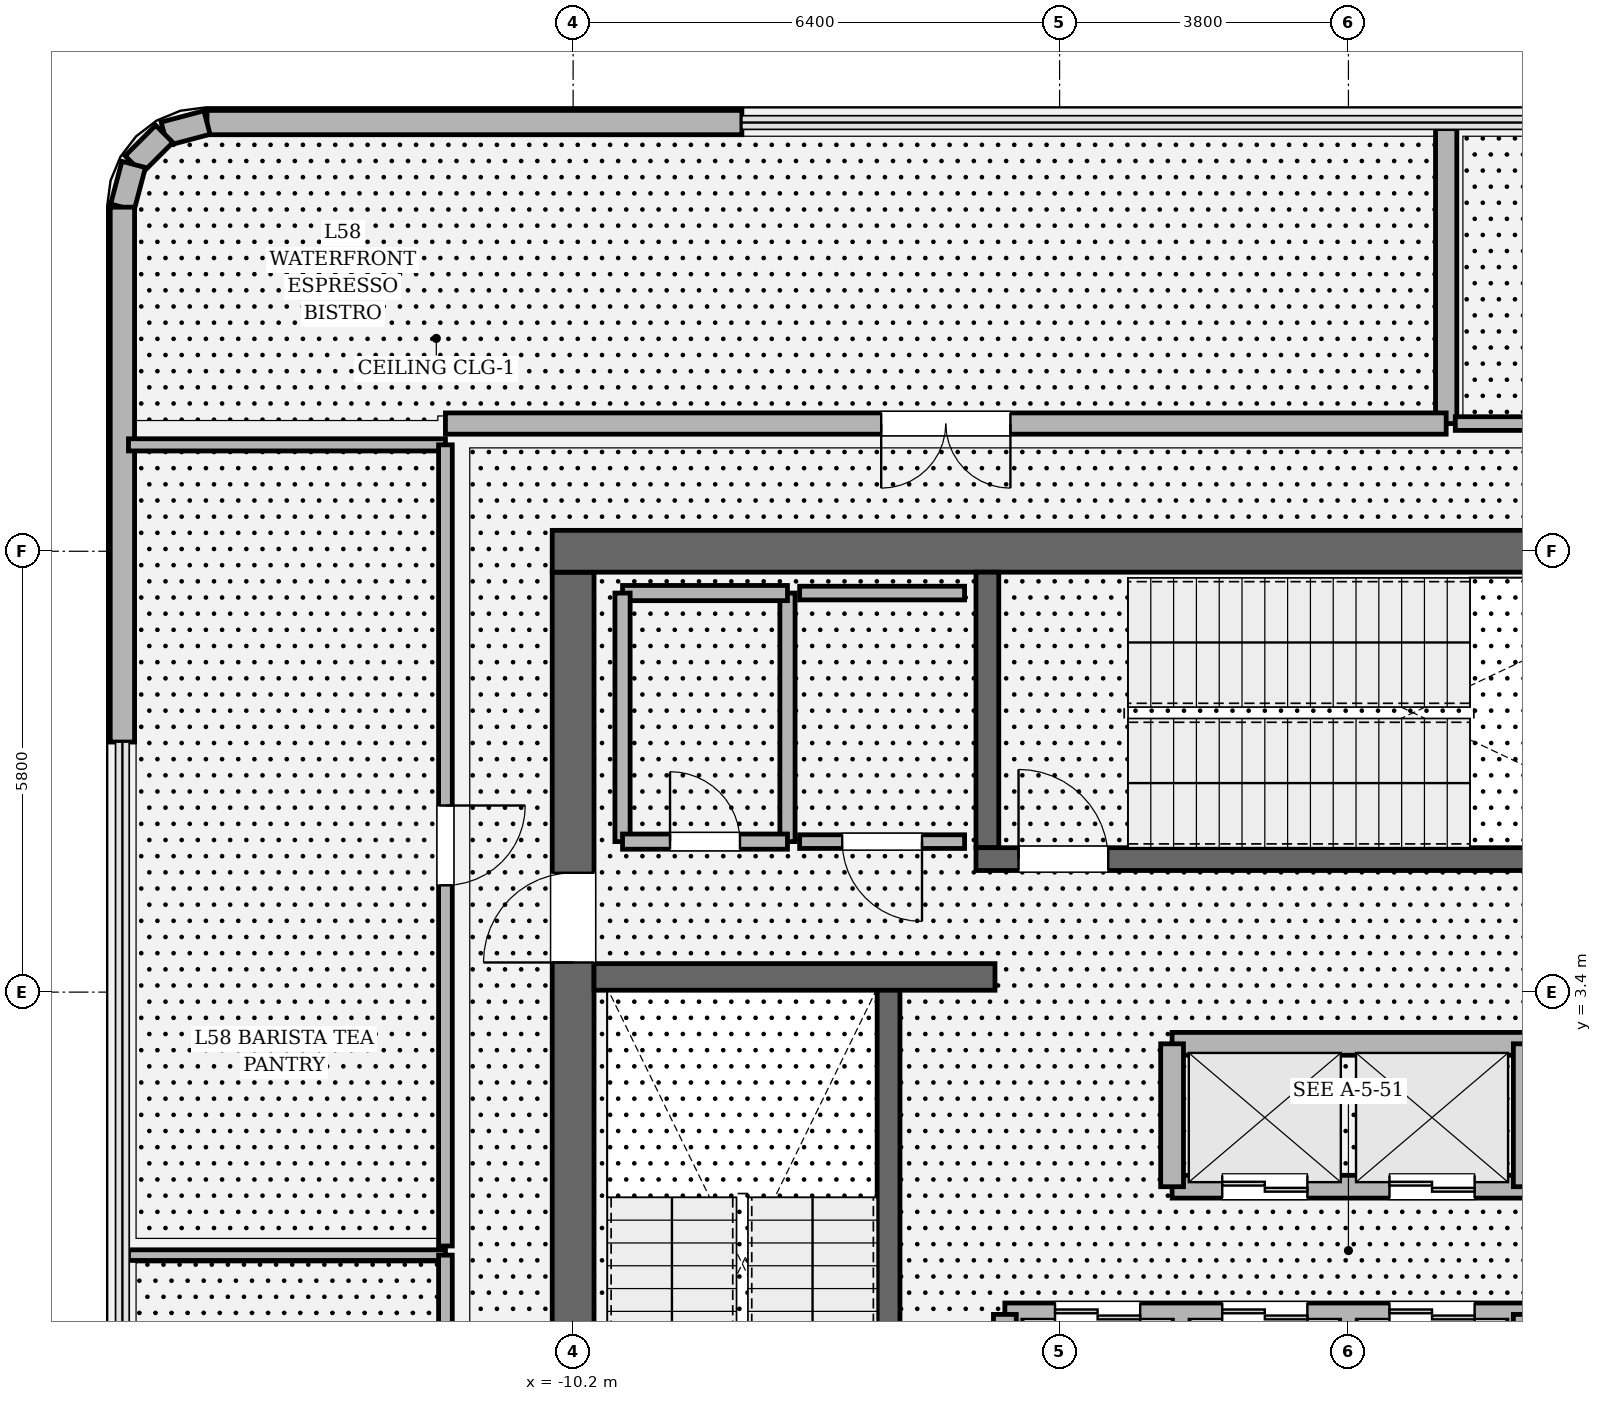
"""IFC4 building model, lengths in metres.
Left out: names, types, materials, properties, quantities, classifications, styles, units other than length and angle.
Written with IfcOpenShell. Run it as: python <this file> out.ifc"""

import sys

from ifc_helpers import new_model, si_unit, direction, frame, frame_2d, origin, place, context, subcontext, project, spatial, rectangle, extrude, element, fill, save


model = new_model("IFC4")
c1 = context("Model", 3, precision=1e-05, world=origin(), true_north=direction((0.0, 1.0)))
c2 = subcontext(c1, "Body", "Model", "MODEL_VIEW")
j1 = project(units=[si_unit("LENGTHUNIT", "METRE"), si_unit("PLANEANGLEUNIT", "RADIAN")], contexts=[c1])
p1 = place(None, origin())
s1 = spatial("IfcSite", under=j1, at=p1, CompositionType="ELEMENT")
p2 = place(p1, origin())
s2 = spatial("IfcBuilding", under=s1, at=p2, CompositionType="ELEMENT")
p3 = place(p2, frame((0.0, 0.0, 246.6)))
s3 = spatial("IfcBuildingStorey", under=s2, at=p3, CompositionType="ELEMENT", Elevation=246.6)
p4 = place(p3, frame((-10.2, -8.925, 0.0), z_axis=(0.0, 0.0, 1.0), x_axis=(0.0, 1.0, 0.0)))
e1 = element("IfcWall", 1, at=p4, inside=s3, PredefinedType="SHEAR", context=c2, shape_type="SweptSolid", body=[
    extrude(rectangle(XDim=17.85, YDim=0.55, at=frame_2d((8.925, 0.0))), origin(), (0.0, 0.0, 1.0), 4.8),
])
p5 = place(p4, frame((12.715, 0.0, 0.0)))
e2 = element("IfcOpeningElement", 2, at=p5, cuts=e1, PredefinedType="OPENING", context=c2, shape_type="SweptSolid", body=[
    extrude(rectangle(XDim=1.18, YDim=2.2, at=frame_2d((0.59, 1.1))), frame((0.0, 0.285, 0.0), z_axis=(0.0, -1.0, 0.0), x_axis=(1.0, 0.0, 0.0)), (0.0, 0.0, 1.0), 0.57),
])
p6 = place(p3, frame((-10.475, 9.2, 0.0), z_axis=(0.0, 0.0, 1.0), x_axis=(1.0, 0.0, 0.0)))
e3 = element("IfcWall", 3, at=p6, inside=s3, PredefinedType="SHEAR", context=c2, shape_type="SweptSolid", body=[
    extrude(rectangle(XDim=20.95, YDim=0.55, at=frame_2d((10.475, 0.0))), origin(), (0.0, 0.0, 1.0), 4.8),
])
p7 = place(p3, frame((-6.05, -5.5, 0.0), z_axis=(0.0, 0.0, 1.0), x_axis=(0.0, 1.0, 0.0)))
e4 = element("IfcWall", 4, at=p7, inside=s3, PredefinedType="SOLIDWALL", context=c2, shape_type="SweptSolid", body=[
    extrude(rectangle(XDim=8.95, YDim=0.3, at=frame_2d((4.475, 0.0))), origin(), (0.0, 0.0, 1.0), 4.8),
])
p8 = place(p3, frame((-4.75, 5.3, 0.0), z_axis=(0.0, 0.0, 1.0), x_axis=(0.0, 1.0, 0.0)))
e5 = element("IfcWall", 5, at=p8, inside=s3, PredefinedType="SOLIDWALL", context=c2, shape_type="SweptSolid", body=[
    extrude(rectangle(XDim=3.625, YDim=0.3, at=frame_2d((1.812, 0.0))), origin(), (0.0, 0.0, 1.0), 4.8),
])
p9 = place(p3, frame((-4.9, 5.15, 0.0), z_axis=(0.0, 0.0, 1.0), x_axis=(1.0, 0.0, 0.0)))
e6 = element("IfcWall", 6, at=p9, inside=s3, PredefinedType="SOLIDWALL", context=c2, shape_type="SweptSolid", body=[
    extrude(rectangle(XDim=9.8, YDim=0.3, at=frame_2d((4.9, 0.0))), origin(), (0.0, 0.0, 1.0), 4.8),
])
p10 = place(p9, frame((0.56, 0.0, 0.0)))
e7 = element("IfcOpeningElement", 7, at=p10, cuts=e6, PredefinedType="OPENING", context=c2, shape_type="SweptSolid", body=[
    extrude(rectangle(XDim=1.18, YDim=2.2, at=frame_2d((0.59, 1.1))), frame((0.0, 0.16, 0.0), z_axis=(0.0, -1.0, 0.0), x_axis=(1.0, 0.0, 0.0)), (0.0, 0.0, 1.0), 0.32),
])
p11 = place(p3, frame((-9.925, 3.6, 0.0), z_axis=(0.0, 0.0, 1.0), x_axis=(1.0, 0.0, 0.0)))
e8 = element("IfcWall", 8, at=p11, inside=s3, PredefinedType="SOLIDWALL", context=c2, shape_type="SweptSolid", body=[
    extrude(rectangle(XDim=5.275, YDim=0.35, at=frame_2d((2.638, 0.0))), origin(), (0.0, 0.0, 1.0), 4.8),
])
p12 = place(p3, frame((-7.98, 14.84, 0.0), z_axis=(0.0, 0.0, 1.0), x_axis=(-1.0, 0.0, 0.0)))
e9 = element("IfcWall", 9, at=p12, inside=s3, PredefinedType="SOLIDWALL", context=c2, shape_type="SweptSolid", body=[
    extrude(rectangle(XDim=7.037, YDim=0.32, at=frame_2d((3.519, 0.0))), origin(), (0.0, 0.0, 1.0), 3.194),
])
p13 = place(p3, frame((-15.017, 14.84, 0.0), z_axis=(0.0, 0.0, 1.0), x_axis=(-0.966665515501, -0.256042537758, 0.0)))
e10 = element("IfcWall", 10, at=p13, inside=s3, PredefinedType="SOLIDWALL", context=c2, shape_type="SweptSolid", body=[
    extrude(rectangle(XDim=0.582, YDim=0.32, at=frame_2d((0.291, 0.0))), origin(), (0.0, 0.0, 1.0), 4.52),
])
p14 = place(p3, frame((-15.579, 14.691, 0.0), z_axis=(0.0, 0.0, 1.0), x_axis=(-0.707106781187, -0.707106781187, 0.0)))
e11 = element("IfcWall", 11, at=p14, inside=s3, PredefinedType="SOLIDWALL", context=c2, shape_type="SweptSolid", body=[
    extrude(rectangle(XDim=0.569, YDim=0.32, at=frame_2d((0.284, 0.0))), origin(), (0.0, 0.0, 1.0), 4.52),
])
p15 = place(p3, frame((-15.981, 14.289, 0.0), z_axis=(0.0, 0.0, 1.0), x_axis=(-0.255650250031, -0.966769336325, 0.0)))
e12 = element("IfcWall", 12, at=p15, inside=s3, PredefinedType="SOLIDWALL", context=c2, shape_type="SweptSolid", body=[
    extrude(rectangle(XDim=0.582, YDim=0.32, at=frame_2d((0.291, 0.0))), origin(), (0.0, 0.0, 1.0), 4.52),
])
p16 = place(p3, frame((-16.13, 13.727, 0.0), z_axis=(0.0, 0.0, 1.0), x_axis=(0.0, -1.0, 0.0)))
e13 = element("IfcWall", 13, at=p16, inside=s3, PredefinedType="SOLIDWALL", context=c2, shape_type="SweptSolid", body=[
    extrude(rectangle(XDim=7.037, YDim=0.32, at=frame_2d((3.519, 0.0))), origin(), (0.0, 0.0, 1.0), 3.194),
])
p17 = place(p3, frame((-4.52, -0.84, 0.0), z_axis=(0.0, 0.0, 1.0), x_axis=(1.0, 0.0, 0.0)))
e14 = element("IfcWall", 14, at=p17, inside=s3, PredefinedType="SOLIDWALL", context=c2, shape_type="SweptSolid", body=[
    extrude(rectangle(XDim=6.84, YDim=0.3, at=frame_2d((3.42, 0.0))), origin(), (0.0, 0.0, 1.0), 4.52),
])
p18 = place(p17, frame((0.66, 0.0, 0.0)))
e15 = element("IfcOpeningElement", 15, at=p18, cuts=e14, PredefinedType="OPENING", context=c2, shape_type="SweptSolid", body=[
    extrude(rectangle(XDim=1.12, YDim=2.25, at=frame_2d((0.56, 1.125))), frame((0.0, 0.16, 0.0), z_axis=(0.0, -1.0, 0.0), x_axis=(1.0, 0.0, 0.0)), (0.0, 0.0, 1.0), 0.32),
])
p19 = place(p17, frame((2.86, 0.0, 0.0)))
e16 = element("IfcOpeningElement", 16, at=p19, cuts=e14, PredefinedType="OPENING", context=c2, shape_type="SweptSolid", body=[
    extrude(rectangle(XDim=1.12, YDim=2.25, at=frame_2d((0.56, 1.125))), frame((0.0, 0.16, 0.0), z_axis=(0.0, -1.0, 0.0), x_axis=(1.0, 0.0, 0.0)), (0.0, 0.0, 1.0), 0.32),
])
p20 = place(p17, frame((5.06, 0.0, 0.0)))
e17 = element("IfcOpeningElement", 17, at=p20, cuts=e14, PredefinedType="OPENING", context=c2, shape_type="SweptSolid", body=[
    extrude(rectangle(XDim=1.12, YDim=2.25, at=frame_2d((0.56, 1.125))), frame((0.0, 0.16, 0.0), z_axis=(0.0, -1.0, 0.0), x_axis=(1.0, 0.0, 0.0)), (0.0, 0.0, 1.0), 0.32),
])
for number, where, z_axis, x_axis in (
    (18, (-4.52, -2.72, 0.0), (0.0, 0.0, 1.0), (0.0, 1.0, 0.0)),
    (19, (2.32, -2.72, 0.0), (0.0, 0.0, 1.0), (0.0, 1.0, 0.0)),
):
    element("IfcWall", number, at=place(p3, frame(where, z_axis=z_axis, x_axis=x_axis)), inside=s3, PredefinedType="SOLIDWALL", context=c2, shape_type="SweptSolid", body=[
        extrude(rectangle(XDim=1.88, YDim=0.3, at=frame_2d((0.94, 0.0))), origin(), (0.0, 0.0, 1.0), 4.52),
    ])
p21 = place(p3, frame((-2.32, 0.84, 0.0), z_axis=(0.0, 0.0, 1.0), x_axis=(1.0, 0.0, 0.0)))
e20 = element("IfcWall", 20, at=p21, inside=s3, PredefinedType="SOLIDWALL", context=c2, shape_type="SweptSolid", body=[
    extrude(rectangle(XDim=4.64, YDim=0.3, at=frame_2d((2.32, 0.0))), origin(), (0.0, 0.0, 1.0), 4.52),
])
p22 = place(p21, frame((0.66, 0.0, 0.0)))
e21 = element("IfcOpeningElement", 21, at=p22, cuts=e20, PredefinedType="OPENING", context=c2, shape_type="SweptSolid", body=[
    extrude(rectangle(XDim=1.12, YDim=2.25, at=frame_2d((0.56, 1.125))), frame((0.0, 0.16, 0.0), z_axis=(0.0, -1.0, 0.0), x_axis=(1.0, 0.0, 0.0)), (0.0, 0.0, 1.0), 0.32),
])
p23 = place(p21, frame((2.86, 0.0, 0.0)))
e22 = element("IfcOpeningElement", 22, at=p23, cuts=e20, PredefinedType="OPENING", context=c2, shape_type="SweptSolid", body=[
    extrude(rectangle(XDim=1.12, YDim=2.25, at=frame_2d((0.56, 1.125))), frame((0.0, 0.16, 0.0), z_axis=(0.0, -1.0, 0.0), x_axis=(1.0, 0.0, 0.0)), (0.0, 0.0, 1.0), 0.32),
])
p24 = place(p3, frame((-2.32, 2.72, 0.0), z_axis=(0.0, 0.0, 1.0), x_axis=(1.0, 0.0, 0.0)))
e23 = element("IfcWall", 23, at=p24, inside=s3, PredefinedType="SOLIDWALL", context=c2, shape_type="SweptSolid", body=[
    extrude(rectangle(XDim=4.64, YDim=0.3, at=frame_2d((2.32, 0.0))), origin(), (0.0, 0.0, 1.0), 4.52),
])
for number, where, z_axis, x_axis in (
    (24, (-2.32, 0.84, 0.0), (0.0, 0.0, 1.0), (0.0, 1.0, 0.0)),
    (25, (2.32, 0.84, 0.0), (0.0, 0.0, 1.0), (0.0, 1.0, 0.0)),
):
    element("IfcWall", number, at=place(p3, frame(where, z_axis=z_axis, x_axis=x_axis)), inside=s3, PredefinedType="SOLIDWALL", context=c2, shape_type="SweptSolid", body=[
        extrude(rectangle(XDim=1.88, YDim=0.3, at=frame_2d((0.94, 0.0))), origin(), (0.0, 0.0, 1.0), 4.52),
    ])
p25 = place(p3, frame((-7.38, 5.38, 0.0), z_axis=(0.0, 0.0, 1.0), x_axis=(0.0, 1.0, 0.0)))
e26 = element("IfcWall", 26, at=p25, inside=s3, PredefinedType="SOLIDWALL", context=c2, shape_type="SweptSolid", body=[
    extrude(rectangle(XDim=3.27, YDim=0.2, at=frame_2d((1.635, 0.0))), origin(), (0.0, 0.0, 1.0), 4.52),
])
p26 = place(p3, frame((-7.38, 8.65, 0.0), z_axis=(0.0, 0.0, 1.0), x_axis=(-1.0, 0.0, 0.0)))
e27 = element("IfcWall", 27, at=p26, inside=s3, PredefinedType="SOLIDWALL", context=c2, shape_type="SweptSolid", body=[
    extrude(rectangle(XDim=2.17, YDim=0.2, at=frame_2d((1.085, 0.0))), origin(), (0.0, 0.0, 1.0), 4.52),
])
p27 = place(p3, frame((-9.55, 8.65, 0.0), z_axis=(0.0, 0.0, 1.0), x_axis=(0.0, -1.0, 0.0)))
e28 = element("IfcWall", 28, at=p27, inside=s3, PredefinedType="SOLIDWALL", context=c2, shape_type="SweptSolid", body=[
    extrude(rectangle(XDim=3.27, YDim=0.2, at=frame_2d((1.635, 0.0))), origin(), (0.0, 0.0, 1.0), 4.52),
])
p28 = place(p3, frame((-9.55, 5.38, 0.0), z_axis=(0.0, 0.0, 1.0), x_axis=(1.0, 0.0, 0.0)))
e29 = element("IfcWall", 29, at=p28, inside=s3, PredefinedType="SOLIDWALL", context=c2, shape_type="SweptSolid", body=[
    extrude(rectangle(XDim=2.17, YDim=0.2, at=frame_2d((1.085, 0.0))), origin(), (0.0, 0.0, 1.0), 4.52),
])
p29 = place(p28, frame((0.625, 0.0, 0.0)))
e30 = element("IfcOpeningElement", 30, at=p29, cuts=e29, PredefinedType="OPENING", context=c2, shape_type="SweptSolid", body=[
    extrude(rectangle(XDim=0.92, YDim=2.1, at=frame_2d((0.46, 1.05))), frame((0.0, 0.11, 0.0), z_axis=(0.0, -1.0, 0.0), x_axis=(1.0, 0.0, 0.0)), (0.0, 0.0, 1.0), 0.22),
])
p30 = place(p3, frame((-5.05, 8.65, 0.0), z_axis=(0.0, 0.0, 1.0), x_axis=(-1.0, 0.0, 0.0)))
e31 = element("IfcWall", 31, at=p30, inside=s3, PredefinedType="PARTITIONING", context=c2, shape_type="SweptSolid", body=[
    extrude(rectangle(XDim=2.17, YDim=0.18, at=frame_2d((1.085, 0.0))), origin(), (0.0, 0.0, 1.0), 4.52),
])
p31 = place(p3, frame((-7.22, 5.38, 0.0), z_axis=(0.0, 0.0, 1.0), x_axis=(1.0, 0.0, 0.0)))
e32 = element("IfcWall", 32, at=p31, inside=s3, PredefinedType="PARTITIONING", context=c2, shape_type="SweptSolid", body=[
    extrude(rectangle(XDim=2.17, YDim=0.18, at=frame_2d((1.085, 0.0))), origin(), (0.0, 0.0, 1.0), 4.52),
])
p32 = place(p31, frame((0.56, 0.0, 0.0)))
e33 = element("IfcOpeningElement", 33, at=p32, cuts=e32, PredefinedType="OPENING", context=c2, shape_type="SweptSolid", body=[
    extrude(rectangle(XDim=1.05, YDim=2.2, at=frame_2d((0.525, 1.1))), frame((0.0, 0.1, 0.0), z_axis=(0.0, -1.0, 0.0), x_axis=(1.0, 0.0, 0.0)), (0.0, 0.0, 1.0), 0.2),
])
p33 = place(p3, frame((-16.05, -0.06, 0.0), z_axis=(0.0, 0.0, 1.0), x_axis=(1.0, 0.0, 0.0)))
e34 = element("IfcWall", 34, at=p33, inside=s3, PredefinedType="PARTITIONING", context=c2, shape_type="SweptSolid", body=[
    extrude(rectangle(XDim=4.17, YDim=0.14, at=frame_2d((2.085, 0.0))), origin(), (0.0, 0.0, 1.0), 4.52),
])
p34 = place(p3, frame((-11.88, -0.06, 0.0), z_axis=(0.0, 0.0, 1.0), x_axis=(0.0, -1.0, 0.0)))
e35 = element("IfcWall", 35, at=p34, inside=s3, PredefinedType="PARTITIONING", context=c2, shape_type="SweptSolid", body=[
    extrude(rectangle(XDim=10.54, YDim=0.18, at=frame_2d((5.27, 0.0))), origin(), (0.0, 0.0, 1.0), 3.194),
])
p35 = place(p34, frame((4.745, 0.0, 0.0)))
e36 = element("IfcOpeningElement", 36, at=p35, cuts=e35, PredefinedType="OPENING", context=c2, shape_type="SweptSolid", body=[
    extrude(rectangle(XDim=1.05, YDim=2.2, at=frame_2d((0.525, 1.1))), frame((0.0, 0.1, 0.0), z_axis=(0.0, -1.0, 0.0), x_axis=(1.0, 0.0, 0.0)), (0.0, 0.0, 1.0), 0.2),
])
p36 = place(p3, frame((-16.05, 10.6, 0.0), z_axis=(0.0, 0.0, 1.0), x_axis=(1.0, 0.0, 0.0)))
e37 = element("IfcWall", 37, at=p36, inside=s3, PredefinedType="PARTITIONING", context=c2, shape_type="SweptSolid", body=[
    extrude(rectangle(XDim=4.17, YDim=0.16, at=frame_2d((2.085, 0.0))), origin(), (0.0, 0.0, 1.0), 4.154),
])
p37 = place(p3, frame((-11.88, 10.6, 0.0), z_axis=(0.0, 0.0, 1.0), x_axis=(0.0, -1.0, 0.0)))
e38 = element("IfcWall", 38, at=p37, inside=s3, PredefinedType="PARTITIONING", context=c2, shape_type="SweptSolid", body=[
    extrude(rectangle(XDim=10.54, YDim=0.18, at=frame_2d((5.27, 0.0))), origin(), (0.0, 0.0, 1.0), 3.194),
])
p38 = place(p37, frame((4.745, 0.0, 0.0)))
e39 = element("IfcOpeningElement", 39, at=p38, cuts=e38, PredefinedType="OPENING", context=c2, shape_type="SweptSolid", body=[
    extrude(rectangle(XDim=1.05, YDim=2.2, at=frame_2d((0.525, 1.1))), frame((0.0, 0.1, 0.0), z_axis=(0.0, -1.0, 0.0), x_axis=(1.0, 0.0, 0.0)), (0.0, 0.0, 1.0), 0.2),
])
p39 = place(p3, frame((1.286, 14.76, 0.0), z_axis=(0.0, 0.0, 1.0), x_axis=(0.0, -1.0, 0.0)))
e40 = element("IfcWall", 40, at=p39, inside=s3, PredefinedType="SOLIDWALL", context=c2, shape_type="SweptSolid", body=[
    extrude(rectangle(XDim=3.88, YDim=0.28, at=frame_2d((1.94, 0.0))), origin(), (0.0, 0.0, 1.0), 4.52),
])
p40 = place(p3, frame((1.286, 10.88, 0.0), z_axis=(0.0, 0.0, 1.0), x_axis=(-1.0, 0.0, 0.0)))
e41 = element("IfcWall", 41, at=p40, inside=s3, PredefinedType="SOLIDWALL", context=c2, shape_type="SweptSolid", body=[
    extrude(rectangle(XDim=13.166, YDim=0.28, at=frame_2d((6.583, 0.0))), origin(), (0.0, 0.0, 1.0), 3.194),
])
p41 = place(p40, frame((5.733, 0.0, 0.0)))
e42 = element("IfcOpeningElement", 42, at=p41, cuts=e41, PredefinedType="OPENING", context=c2, shape_type="SweptSolid", body=[
    extrude(rectangle(XDim=1.7, YDim=2.3, at=frame_2d((0.85, 1.15))), frame((0.0, 0.15, 0.0), z_axis=(0.0, -1.0, 0.0), x_axis=(1.0, 0.0, 0.0)), (0.0, 0.0, 1.0), 0.3),
])
p42 = place(p3, frame((11.88, 10.88, 0.0), z_axis=(0.0, 0.0, 1.0), x_axis=(-1.0, 0.0, 0.0)))
e43 = element("IfcWall", 43, at=p42, inside=s3, PredefinedType="PARTITIONING", context=c2, shape_type="SweptSolid", body=[
    extrude(rectangle(XDim=10.474, YDim=0.18, at=frame_2d((5.237, 0.0))), origin(), (0.0, 0.0, 1.0), 3.194),
])
p43 = place(p42, frame((4.712, 0.0, 0.0)))
e44 = element("IfcOpeningElement", 44, at=p43, cuts=e43, PredefinedType="OPENING", context=c2, shape_type="SweptSolid", body=[
    extrude(rectangle(XDim=1.05, YDim=2.2, at=frame_2d((0.525, 1.1))), frame((0.0, 0.1, 0.0), z_axis=(0.0, -1.0, 0.0), x_axis=(1.0, 0.0, 0.0)), (0.0, 0.0, 1.0), 0.2),
])
p44 = place(p10, origin())
e45 = element("IfcDoor", 45, at=p44, inside=s3, OperationType="SINGLE_SWING_LEFT", PredefinedType="DOOR", context=c2, shape_type="SweptSolid", body=[
    extrude(rectangle(XDim=1.18, YDim=2.2, at=frame_2d((0.59, 1.1))), frame((0.0, 0.025, 0.0), z_axis=(0.0, -1.0, 0.0), x_axis=(1.0, 0.0, 0.0)), (0.0, 0.0, 1.0), 0.05),
])
fill(e7, e45)
p45 = place(p5, origin())
e46 = element("IfcDoor", 46, at=p45, inside=s3, OperationType="SINGLE_SWING_LEFT", PredefinedType="DOOR", context=c2, shape_type="SweptSolid", body=[
    extrude(rectangle(XDim=1.18, YDim=2.2, at=frame_2d((0.59, 1.1))), frame((0.0, 0.025, 0.0), z_axis=(0.0, -1.0, 0.0), x_axis=(1.0, 0.0, 0.0)), (0.0, 0.0, 1.0), 0.05),
])
fill(e2, e46)
p46 = place(p18, origin())
e47 = element("IfcDoor", 47, at=p46, inside=s3, OperationType="DOUBLE_DOOR_SLIDING", PredefinedType="DOOR", context=c2, shape_type="SweptSolid", body=[
    extrude(rectangle(XDim=1.12, YDim=2.25, at=frame_2d((0.56, 1.125))), frame((0.0, 0.025, 0.0), z_axis=(0.0, -1.0, 0.0), x_axis=(1.0, 0.0, 0.0)), (0.0, 0.0, 1.0), 0.05),
])
fill(e15, e47)
p47 = place(p19, origin())
e48 = element("IfcDoor", 48, at=p47, inside=s3, OperationType="DOUBLE_DOOR_SLIDING", PredefinedType="DOOR", context=c2, shape_type="SweptSolid", body=[
    extrude(rectangle(XDim=1.12, YDim=2.25, at=frame_2d((0.56, 1.125))), frame((0.0, 0.025, 0.0), z_axis=(0.0, -1.0, 0.0), x_axis=(1.0, 0.0, 0.0)), (0.0, 0.0, 1.0), 0.05),
])
fill(e16, e48)
p48 = place(p20, origin())
e49 = element("IfcDoor", 49, at=p48, inside=s3, OperationType="DOUBLE_DOOR_SLIDING", PredefinedType="DOOR", context=c2, shape_type="SweptSolid", body=[
    extrude(rectangle(XDim=1.12, YDim=2.25, at=frame_2d((0.56, 1.125))), frame((0.0, 0.025, 0.0), z_axis=(0.0, -1.0, 0.0), x_axis=(1.0, 0.0, 0.0)), (0.0, 0.0, 1.0), 0.05),
])
fill(e17, e49)
p49 = place(p22, origin())
e50 = element("IfcDoor", 50, at=p49, inside=s3, OperationType="DOUBLE_DOOR_SLIDING", PredefinedType="DOOR", context=c2, shape_type="SweptSolid", body=[
    extrude(rectangle(XDim=1.12, YDim=2.25, at=frame_2d((0.56, 1.125))), frame((0.0, 0.025, 0.0), z_axis=(0.0, -1.0, 0.0), x_axis=(1.0, 0.0, 0.0)), (0.0, 0.0, 1.0), 0.05),
])
fill(e21, e50)
p50 = place(p23, origin())
e51 = element("IfcDoor", 51, at=p50, inside=s3, OperationType="DOUBLE_DOOR_SLIDING", PredefinedType="DOOR", context=c2, shape_type="SweptSolid", body=[
    extrude(rectangle(XDim=1.12, YDim=2.25, at=frame_2d((0.56, 1.125))), frame((0.0, 0.025, 0.0), z_axis=(0.0, -1.0, 0.0), x_axis=(1.0, 0.0, 0.0)), (0.0, 0.0, 1.0), 0.05),
])
fill(e22, e51)
p51 = place(p29, origin())
e52 = element("IfcDoor", 52, at=p51, inside=s3, OperationType="SINGLE_SWING_LEFT", PredefinedType="DOOR", context=c2, shape_type="SweptSolid", body=[
    extrude(rectangle(XDim=0.92, YDim=2.1, at=frame_2d((0.46, 1.05))), frame((0.0, 0.025, 0.0), z_axis=(0.0, -1.0, 0.0), x_axis=(1.0, 0.0, 0.0)), (0.0, 0.0, 1.0), 0.05),
])
fill(e30, e52)
p52 = place(p32, origin())
e53 = element("IfcDoor", 53, at=p52, inside=s3, OperationType="SINGLE_SWING_RIGHT", PredefinedType="DOOR", context=c2, shape_type="SweptSolid", body=[
    extrude(rectangle(XDim=1.05, YDim=2.2, at=frame_2d((0.525, 1.1))), frame((0.0, 0.025, 0.0), z_axis=(0.0, -1.0, 0.0), x_axis=(1.0, 0.0, 0.0)), (0.0, 0.0, 1.0), 0.05),
])
fill(e33, e53)
p53 = place(p38, origin())
e54 = element("IfcDoor", 54, at=p53, inside=s3, OperationType="SINGLE_SWING_LEFT", PredefinedType="DOOR", context=c2, shape_type="SweptSolid", body=[
    extrude(rectangle(XDim=1.05, YDim=2.2, at=frame_2d((0.525, 1.1))), frame((0.0, 0.025, 0.0), z_axis=(0.0, -1.0, 0.0), x_axis=(1.0, 0.0, 0.0)), (0.0, 0.0, 1.0), 0.05),
])
fill(e39, e54)
p54 = place(p41, origin())
e55 = element("IfcDoor", 55, at=p54, inside=s3, OperationType="DOUBLE_DOOR_SINGLE_SWING", PredefinedType="DOOR", context=c2, shape_type="SweptSolid", body=[
    extrude(rectangle(XDim=1.7, YDim=2.3, at=frame_2d((0.85, 1.15))), frame((0.0, 0.025, 0.0), z_axis=(0.0, -1.0, 0.0), x_axis=(1.0, 0.0, 0.0)), (0.0, 0.0, 1.0), 0.05),
])
fill(e42, e55)
save(model, sys.argv[1])
